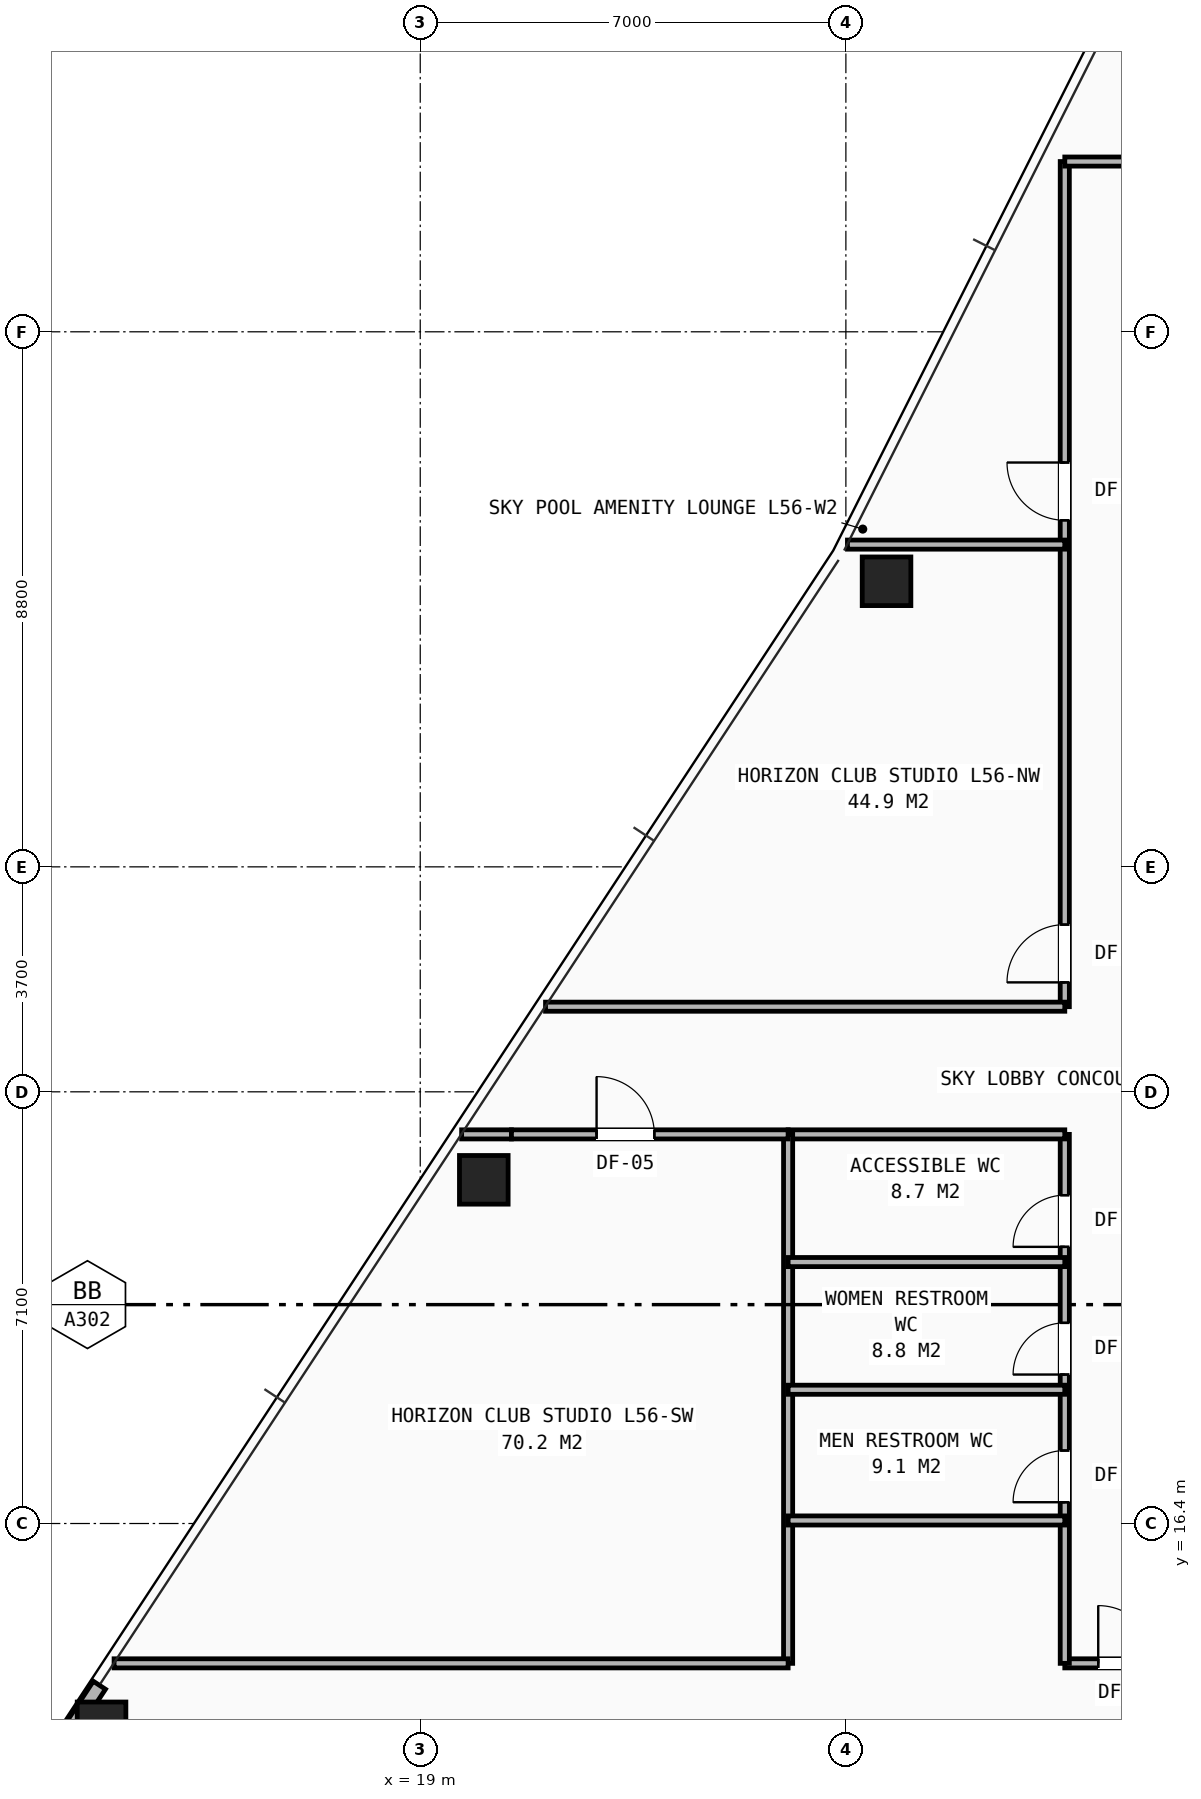
"""IFC4 building model, lengths in metres.
Left out: names, types, materials, properties, quantities, classifications, styles, units other than length and angle.
Written with IfcOpenShell. Run it as: python <this file> out.ifc"""

import sys

from ifc_helpers import new_model, si_unit, direction, frame, frame_2d, origin, origin_2d, place, context, subcontext, project, spatial, rectangle, hollow_rectangle, extrude, element, fill, save


model = new_model("IFC4")
c1 = context("Model", 3, precision=1e-05, world=origin(), true_north=direction((0.0, 1.0)))
c2 = subcontext(c1, "Body", "Model", "MODEL_VIEW")
j1 = project(units=[si_unit("LENGTHUNIT", "METRE"), si_unit("PLANEANGLEUNIT", "RADIAN")], contexts=[c1])
p1 = place(None, origin())
s1 = spatial("IfcSite", under=j1, at=p1, CompositionType="ELEMENT")
p2 = place(p1, origin())
s2 = spatial("IfcBuilding", under=s1, at=p2, CompositionType="ELEMENT")
p3 = place(p2, frame((0.0, 0.0, 196.5)))
s3 = spatial("IfcBuildingStorey", under=s2, at=p3, CompositionType="ELEMENT", Elevation=196.5)
for number, where, z_axis, x_axis in (
    (1, (26.669, 31.897, 0.0), (0.0, 0.0, 1.0), (1.0, 0.0, 0.0)),
    (2, (20.045, 22.052, 0.0), (0.0, 0.0, 1.0), (1.0, 0.0, 0.0)),
    (3, (13.759, 13.064, 0.0), (0.0, 0.0, 1.0), (1.0, 0.0, 0.0)),
):
    element("IfcColumn", number, at=place(p3, frame(where, z_axis=z_axis, x_axis=x_axis)), inside=s3, PredefinedType="COLUMN", context=c2, shape_type="SweptSolid", body=[
        extrude(hollow_rectangle(XDim=0.8, YDim=0.8, WallThickness=0.055, at=origin_2d()), origin(), (0.0, 0.0, 1.0), 4.2),
    ])
p4 = place(p3, frame((13.723, 13.74, 0.0), z_axis=(0.0, 0.0, 1.0), x_axis=(-0.549064814004, -0.835779773638, 0.0)))
e4 = element("IfcWall", 4, at=p4, inside=s3, PredefinedType="SHEAR", context=c2, shape_type="SweptSolid", body=[
    extrude(rectangle(XDim=1.292, YDim=0.24, at=frame_2d((0.646, 0.0))), origin(), (0.0, 0.0, 1.0), 3.313),
])
p5 = place(p3, frame((29.6, 14.1, 0.0), z_axis=(0.0, 0.0, 1.0), x_axis=(1.0, 0.0, 0.0)))
e5 = element("IfcWall", 5, at=p5, inside=s3, PredefinedType="PARTITIONING", context=c2, shape_type="SweptSolid", body=[
    extrude(rectangle(XDim=18.6, YDim=0.15, at=frame_2d((9.3, 0.0))), origin(), (0.0, 0.0, 1.0), 3.051),
])
p6 = place(p5, frame((0.55, 0.0, 0.0)))
e6 = element("IfcOpeningElement", 6, at=p6, cuts=e5, PredefinedType="OPENING", context=c2, shape_type="SweptSolid", body=[
    extrude(rectangle(XDim=0.95, YDim=2.1, at=frame_2d((0.475, 1.05))), frame((0.0, 0.085, 0.0), z_axis=(0.0, -1.0, 0.0), x_axis=(1.0, 0.0, 0.0)), (0.0, 0.0, 1.0), 0.17),
])
p7 = place(p5, frame((8.75, 0.0, 0.0)))
e7 = element("IfcOpeningElement", 7, at=p7, cuts=e5, PredefinedType="OPENING", context=c2, shape_type="SweptSolid", body=[
    extrude(rectangle(XDim=0.95, YDim=2.1, at=frame_2d((0.475, 1.05))), frame((0.0, 0.085, 0.0), z_axis=(0.0, -1.0, 0.0), x_axis=(1.0, 0.0, 0.0)), (0.0, 0.0, 1.0), 0.17),
])
p8 = place(p3, frame((29.6, 14.1, 0.0), z_axis=(0.0, 0.0, 1.0), x_axis=(0.0, 1.0, 0.0)))
e8 = element("IfcWall", 8, at=p8, inside=s3, PredefinedType="PARTITIONING", context=c2, shape_type="SweptSolid", body=[
    extrude(rectangle(XDim=8.7, YDim=0.15, at=frame_2d((4.35, 0.0))), origin(), (0.0, 0.0, 1.0), 3.94),
])
p9 = place(p8, frame((2.65, 0.0, 0.0)))
e9 = element("IfcOpeningElement", 9, at=p9, cuts=e8, PredefinedType="OPENING", context=c2, shape_type="SweptSolid", body=[
    extrude(rectangle(XDim=0.85, YDim=2.05, at=frame_2d((0.425, 1.025))), frame((0.0, 0.085, 0.0), z_axis=(0.0, -1.0, 0.0), x_axis=(1.0, 0.0, 0.0)), (0.0, 0.0, 1.0), 0.17),
])
p10 = place(p8, frame((4.75, 0.0, 0.0)))
e10 = element("IfcOpeningElement", 10, at=p10, cuts=e8, PredefinedType="OPENING", context=c2, shape_type="SweptSolid", body=[
    extrude(rectangle(XDim=0.85, YDim=2.05, at=frame_2d((0.425, 1.025))), frame((0.0, 0.085, 0.0), z_axis=(0.0, -1.0, 0.0), x_axis=(1.0, 0.0, 0.0)), (0.0, 0.0, 1.0), 0.17),
])
p11 = place(p8, frame((6.85, 0.0, 0.0)))
e11 = element("IfcOpeningElement", 11, at=p11, cuts=e8, PredefinedType="OPENING", context=c2, shape_type="SweptSolid", body=[
    extrude(rectangle(XDim=0.85, YDim=2.05, at=frame_2d((0.425, 1.025))), frame((0.0, 0.085, 0.0), z_axis=(0.0, -1.0, 0.0), x_axis=(1.0, 0.0, 0.0)), (0.0, 0.0, 1.0), 0.17),
])
p12 = place(p3, frame((29.6, 24.9, 0.0), z_axis=(0.0, 0.0, 1.0), x_axis=(0.0, 1.0, 0.0)))
e12 = element("IfcWall", 12, at=p12, inside=s3, PredefinedType="PARTITIONING", context=c2, shape_type="SweptSolid", body=[
    extrude(rectangle(XDim=13.9, YDim=0.15, at=frame_2d((6.95, 0.0))), origin(), (0.0, 0.0, 1.0), 2.955),
])
p13 = place(p12, frame((0.4, 0.0, 0.0)))
e13 = element("IfcOpeningElement", 13, at=p13, cuts=e12, PredefinedType="OPENING", context=c2, shape_type="SweptSolid", body=[
    extrude(rectangle(XDim=0.95, YDim=2.1, at=frame_2d((0.475, 1.05))), frame((0.0, 0.085, 0.0), z_axis=(0.0, -1.0, 0.0), x_axis=(1.0, 0.0, 0.0)), (0.0, 0.0, 1.0), 0.17),
])
p14 = place(p12, frame((8.0, 0.0, 0.0)))
e14 = element("IfcOpeningElement", 14, at=p14, cuts=e12, PredefinedType="OPENING", context=c2, shape_type="SweptSolid", body=[
    extrude(rectangle(XDim=0.95, YDim=2.1, at=frame_2d((0.475, 1.05))), frame((0.0, 0.085, 0.0), z_axis=(0.0, -1.0, 0.0), x_axis=(1.0, 0.0, 0.0)), (0.0, 0.0, 1.0), 0.17),
])
p15 = place(p3, frame((29.6, 38.8, 0.0), z_axis=(0.0, 0.0, 1.0), x_axis=(1.0, 0.0, 0.0)))
e15 = element("IfcWall", 15, at=p15, inside=s3, PredefinedType="PARTITIONING", context=c2, shape_type="SweptSolid", body=[
    extrude(rectangle(XDim=2.2, YDim=0.15, at=frame_2d((1.1, 0.0))), origin(), (0.0, 0.0, 1.0), 3.319),
])
p16 = place(p3, frame((19.681, 22.8, 0.0), z_axis=(0.0, 0.0, 1.0), x_axis=(1.0, 0.0, 0.0)))
e16 = element("IfcWall", 16, at=p16, inside=s3, PredefinedType="PARTITIONING", context=c2, shape_type="SweptSolid", body=[
    extrude(rectangle(XDim=0.819, YDim=0.15, at=frame_2d((0.41, 0.0))), origin(), (0.0, 0.0, 1.0), 3.319),
])
p17 = place(p3, frame((25.05, 22.8, 0.0), z_axis=(0.0, 0.0, 1.0), x_axis=(1.0, 0.0, 0.0)))
e17 = element("IfcWall", 17, at=p17, inside=s3, PredefinedType="PARTITIONING", context=c2, shape_type="SweptSolid", body=[
    extrude(rectangle(XDim=4.55, YDim=0.15, at=frame_2d((2.275, 0.0))), origin(), (0.0, 0.0, 1.0), 3.523),
])
p18 = place(p3, frame((21.06, 24.9, 0.0), z_axis=(0.0, 0.0, 1.0), x_axis=(1.0, 0.0, 0.0)))
e18 = element("IfcWall", 18, at=p18, inside=s3, PredefinedType="PARTITIONING", context=c2, shape_type="SweptSolid", body=[
    extrude(rectangle(XDim=8.54, YDim=0.15, at=frame_2d((4.27, 0.0))), origin(), (0.0, 0.0, 1.0), 3.319),
])
p19 = place(p3, frame((25.05, 14.1, 0.0), z_axis=(0.0, 0.0, 1.0), x_axis=(0.0, 1.0, 0.0)))
e19 = element("IfcWall", 19, at=p19, inside=s3, PredefinedType="PARTITIONING", context=c2, shape_type="SweptSolid", body=[
    extrude(rectangle(XDim=8.7, YDim=0.15, at=frame_2d((4.35, 0.0))), origin(), (0.0, 0.0, 1.0), 3.523),
])
for number, where, z_axis, x_axis in (
    (20, (25.05, 16.45, 0.0), (0.0, 0.0, 1.0), (1.0, 0.0, 0.0)),
    (21, (25.05, 18.6, 0.0), (0.0, 0.0, 1.0), (1.0, 0.0, 0.0)),
    (22, (25.05, 20.7, 0.0), (0.0, 0.0, 1.0), (1.0, 0.0, 0.0)),
):
    element("IfcWall", number, at=place(p3, frame(where, z_axis=z_axis, x_axis=x_axis)), inside=s3, PredefinedType="PARTITIONING", context=c2, shape_type="SweptSolid", body=[
        extrude(rectangle(XDim=4.55, YDim=0.15, at=frame_2d((2.275, 0.0))), origin(), (0.0, 0.0, 1.0), 3.94),
    ])
p20 = place(p3, frame((13.965, 14.1, 0.0), z_axis=(0.0, 0.0, 1.0), x_axis=(1.0, 0.0, 0.0)))
e23 = element("IfcWall", 23, at=p20, inside=s3, PredefinedType="PARTITIONING", context=c2, shape_type="SweptSolid", body=[
    extrude(rectangle(XDim=11.085, YDim=0.15, at=frame_2d((5.542, 0.0))), origin(), (0.0, 0.0, 1.0), 2.955),
])
p21 = place(p3, frame((20.5, 22.8, 0.0), z_axis=(0.0, 0.0, 1.0), x_axis=(1.0, 0.0, 0.0)))
e24 = element("IfcWall", 24, at=p21, inside=s3, PredefinedType="PARTITIONING", context=c2, shape_type="SweptSolid", body=[
    extrude(rectangle(XDim=4.55, YDim=0.15, at=frame_2d((2.275, 0.0))), origin(), (0.0, 0.0, 1.0), 3.319),
])
p22 = place(p21, frame((1.4, 0.0, 0.0)))
e25 = element("IfcOpeningElement", 25, at=p22, cuts=e24, PredefinedType="OPENING", context=c2, shape_type="SweptSolid", body=[
    extrude(rectangle(XDim=0.95, YDim=2.1, at=frame_2d((0.475, 1.05))), frame((0.0, 0.085, 0.0), z_axis=(0.0, -1.0, 0.0), x_axis=(1.0, 0.0, 0.0)), (0.0, 0.0, 1.0), 0.17),
])
p23 = place(p3, frame((26.026, 32.5, 0.0), z_axis=(0.0, 0.0, 1.0), x_axis=(1.0, 0.0, 0.0)))
e26 = element("IfcWall", 26, at=p23, inside=s3, PredefinedType="PARTITIONING", context=c2, shape_type="SweptSolid", body=[
    extrude(rectangle(XDim=3.574, YDim=0.15, at=frame_2d((1.787, 0.0))), origin(), (0.0, 0.0, 1.0), 3.319),
])
p24 = place(p9, origin())
e27 = element("IfcDoor", 27, at=p24, inside=s3, OperationType="SINGLE_SWING_LEFT", PredefinedType="DOOR", context=c2, shape_type="SweptSolid", body=[
    extrude(rectangle(XDim=0.85, YDim=2.05, at=frame_2d((0.425, 1.025))), frame((0.0, 0.025, 0.0), z_axis=(0.0, -1.0, 0.0), x_axis=(1.0, 0.0, 0.0)), (0.0, 0.0, 1.0), 0.05),
])
fill(e9, e27)
p25 = place(p10, origin())
e28 = element("IfcDoor", 28, at=p25, inside=s3, OperationType="SINGLE_SWING_LEFT", PredefinedType="DOOR", context=c2, shape_type="SweptSolid", body=[
    extrude(rectangle(XDim=0.85, YDim=2.05, at=frame_2d((0.425, 1.025))), frame((0.0, 0.025, 0.0), z_axis=(0.0, -1.0, 0.0), x_axis=(1.0, 0.0, 0.0)), (0.0, 0.0, 1.0), 0.05),
])
fill(e10, e28)
p26 = place(p11, origin())
e29 = element("IfcDoor", 29, at=p26, inside=s3, OperationType="SINGLE_SWING_LEFT", PredefinedType="DOOR", context=c2, shape_type="SweptSolid", body=[
    extrude(rectangle(XDim=0.85, YDim=2.05, at=frame_2d((0.425, 1.025))), frame((0.0, 0.025, 0.0), z_axis=(0.0, -1.0, 0.0), x_axis=(1.0, 0.0, 0.0)), (0.0, 0.0, 1.0), 0.05),
])
fill(e11, e29)
p27 = place(p6, origin())
e30 = element("IfcDoor", 30, at=p27, inside=s3, OperationType="SINGLE_SWING_LEFT", PredefinedType="DOOR", context=c2, shape_type="SweptSolid", body=[
    extrude(rectangle(XDim=0.95, YDim=2.1, at=frame_2d((0.475, 1.05))), frame((0.0, 0.025, 0.0), z_axis=(0.0, -1.0, 0.0), x_axis=(1.0, 0.0, 0.0)), (0.0, 0.0, 1.0), 0.05),
])
fill(e6, e30)
p28 = place(p22, origin())
e31 = element("IfcDoor", 31, at=p28, inside=s3, OperationType="SINGLE_SWING_LEFT", PredefinedType="DOOR", context=c2, shape_type="SweptSolid", body=[
    extrude(rectangle(XDim=0.95, YDim=2.1, at=frame_2d((0.475, 1.05))), frame((0.0, 0.025, 0.0), z_axis=(0.0, -1.0, 0.0), x_axis=(1.0, 0.0, 0.0)), (0.0, 0.0, 1.0), 0.05),
])
fill(e25, e31)
p29 = place(p13, origin())
e32 = element("IfcDoor", 32, at=p29, inside=s3, OperationType="SINGLE_SWING_LEFT", PredefinedType="DOOR", context=c2, shape_type="SweptSolid", body=[
    extrude(rectangle(XDim=0.95, YDim=2.1, at=frame_2d((0.475, 1.05))), frame((0.0, 0.025, 0.0), z_axis=(0.0, -1.0, 0.0), x_axis=(1.0, 0.0, 0.0)), (0.0, 0.0, 1.0), 0.05),
])
fill(e13, e32)
p30 = place(p14, origin())
e33 = element("IfcDoor", 33, at=p30, inside=s3, OperationType="SINGLE_SWING_RIGHT", PredefinedType="DOOR", context=c2, shape_type="SweptSolid", body=[
    extrude(rectangle(XDim=0.95, YDim=2.1, at=frame_2d((0.475, 1.05))), frame((0.0, 0.025, 0.0), z_axis=(0.0, -1.0, 0.0), x_axis=(1.0, 0.0, 0.0)), (0.0, 0.0, 1.0), 0.05),
])
fill(e14, e33)
save(model, sys.argv[1])
